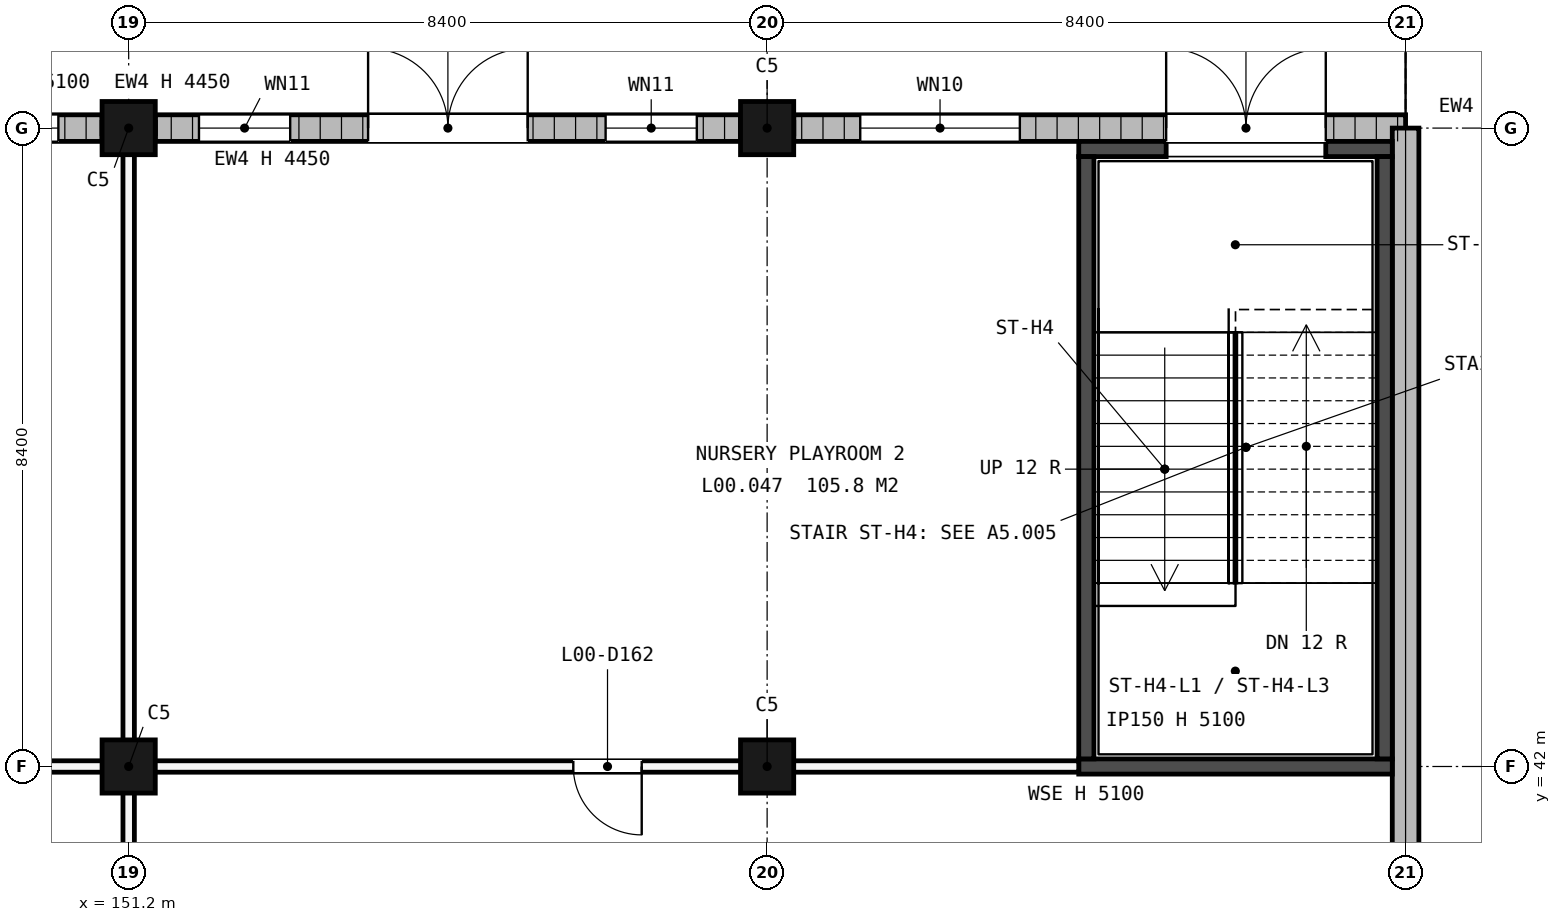
"""IFC4 building model, lengths in metres.
Left out: names, types, materials, properties, quantities, classifications, styles, units other than length and angle.
Written with IfcOpenShell. Run it as: python <this file> out.ifc"""

import sys

from ifc_helpers import new_model, si_unit, direction, frame, frame_2d, origin, origin_2d, place, context, subcontext, project, spatial, rectangle, extrude, element, fill, save


model = new_model("IFC4")
c1 = context("Model", 3, precision=1e-05, world=origin(), true_north=direction((0.0, 1.0)))
c2 = subcontext(c1, "Body", "Model", "MODEL_VIEW")
j1 = project(units=[si_unit("LENGTHUNIT", "METRE"), si_unit("PLANEANGLEUNIT", "RADIAN")], contexts=[c1])
p1 = place(None, origin())
s1 = spatial("IfcSite", under=j1, at=p1, CompositionType="ELEMENT")
p2 = place(p1, origin())
s2 = spatial("IfcBuilding", under=s1, at=p2, CompositionType="ELEMENT")
p3 = place(p2, origin())
s3 = spatial("IfcBuildingStorey", under=s2, at=p3, CompositionType="ELEMENT", Elevation=0.0)
for number, where, z_axis, x_axis in (
    (1, (151.2, 42.0, -0.3), (0.0, 0.0, 1.0), (1.0, 0.0, 0.0)),
    (2, (151.2, 50.4, -0.3), (0.0, 0.0, 1.0), (1.0, 0.0, 0.0)),
    (3, (159.6, 42.0, -0.3), (0.0, 0.0, 1.0), (1.0, 0.0, 0.0)),
    (4, (159.6, 50.4, -0.3), (0.0, 0.0, 1.0), (1.0, 0.0, 0.0)),
):
    element("IfcColumn", number, at=place(p3, frame(where, z_axis=z_axis, x_axis=x_axis)), inside=s3, PredefinedType="COLUMN", context=c2, shape_type="SweptSolid", body=[
        extrude(rectangle(XDim=0.7, YDim=0.7, at=origin_2d()), origin(), (0.0, 0.0, 1.0), 5.4),
    ])
p4 = place(p3, frame((143.15, 50.4, 0.0), z_axis=(0.0, 0.0, 1.0), x_axis=(1.0, 0.0, 0.0)))
e5 = element("IfcWall", 5, at=p4, inside=s3, PredefinedType="STANDARD", context=c2, shape_type="SweptSolid", body=[
    extrude(rectangle(XDim=7.7, YDim=0.35, at=frame_2d((3.85, 0.0))), origin(), (0.0, 0.0, 1.0), 4.45),
])
p5 = place(p4, frame((2.8, 0.0, 0.0)))
e6 = element("IfcOpeningElement", 6, at=p5, cuts=e5, PredefinedType="OPENING", context=c2, shape_type="SweptSolid", body=[
    extrude(rectangle(XDim=2.1, YDim=2.2, at=frame_2d((1.05, 1.1))), frame((0.0, 0.185, 0.0), z_axis=(0.0, -1.0, 0.0), x_axis=(1.0, 0.0, 0.0)), (0.0, 0.0, 1.0), 0.37),
])
p6 = place(p4, frame((0.575, 0.0, 0.6)))
e7 = element("IfcOpeningElement", 7, at=p6, cuts=e5, PredefinedType="OPENING", context=c2, shape_type="SweptSolid", body=[
    extrude(rectangle(XDim=1.2, YDim=1.8, at=frame_2d((0.6, 0.9))), frame((0.0, 0.185, 0.0), z_axis=(0.0, -1.0, 0.0), x_axis=(1.0, 0.0, 0.0)), (0.0, 0.0, 1.0), 0.37),
])
p7 = place(p4, frame((5.925, 0.0, 0.6)))
e8 = element("IfcOpeningElement", 8, at=p7, cuts=e5, PredefinedType="OPENING", context=c2, shape_type="SweptSolid", body=[
    extrude(rectangle(XDim=1.2, YDim=1.8, at=frame_2d((0.6, 0.9))), frame((0.0, 0.185, 0.0), z_axis=(0.0, -1.0, 0.0), x_axis=(1.0, 0.0, 0.0)), (0.0, 0.0, 1.0), 0.37),
])
p8 = place(p3, frame((151.55, 50.4, 0.0), z_axis=(0.0, 0.0, 1.0), x_axis=(1.0, 0.0, 0.0)))
e9 = element("IfcWall", 9, at=p8, inside=s3, PredefinedType="STANDARD", context=c2, shape_type="SweptSolid", body=[
    extrude(rectangle(XDim=7.7, YDim=0.35, at=frame_2d((3.85, 0.0))), origin(), (0.0, 0.0, 1.0), 4.45),
])
p9 = place(p8, frame((2.8, 0.0, 0.0)))
e10 = element("IfcOpeningElement", 10, at=p9, cuts=e9, PredefinedType="OPENING", context=c2, shape_type="SweptSolid", body=[
    extrude(rectangle(XDim=2.1, YDim=2.2, at=frame_2d((1.05, 1.1))), frame((0.0, 0.185, 0.0), z_axis=(0.0, -1.0, 0.0), x_axis=(1.0, 0.0, 0.0)), (0.0, 0.0, 1.0), 0.37),
])
p10 = place(p8, frame((0.575, 0.0, 0.6)))
e11 = element("IfcOpeningElement", 11, at=p10, cuts=e9, PredefinedType="OPENING", context=c2, shape_type="SweptSolid", body=[
    extrude(rectangle(XDim=1.2, YDim=1.8, at=frame_2d((0.6, 0.9))), frame((0.0, 0.185, 0.0), z_axis=(0.0, -1.0, 0.0), x_axis=(1.0, 0.0, 0.0)), (0.0, 0.0, 1.0), 0.37),
])
p11 = place(p8, frame((5.925, 0.0, 0.6)))
e12 = element("IfcOpeningElement", 12, at=p11, cuts=e9, PredefinedType="OPENING", context=c2, shape_type="SweptSolid", body=[
    extrude(rectangle(XDim=1.2, YDim=1.8, at=frame_2d((0.6, 0.9))), frame((0.0, 0.185, 0.0), z_axis=(0.0, -1.0, 0.0), x_axis=(1.0, 0.0, 0.0)), (0.0, 0.0, 1.0), 0.37),
])
p12 = place(p3, frame((159.95, 50.4, 0.0), z_axis=(0.0, 0.0, 1.0), x_axis=(1.0, 0.0, 0.0)))
e13 = element("IfcWall", 13, at=p12, inside=s3, PredefinedType="STANDARD", context=c2, shape_type="SweptSolid", body=[
    extrude(rectangle(XDim=8.05, YDim=0.35, at=frame_2d((4.025, 0.0))), origin(), (0.0, 0.0, 1.0), 5.1),
])
p13 = place(p12, frame((4.9, 0.0, 0.0)))
e14 = element("IfcOpeningElement", 14, at=p13, cuts=e13, PredefinedType="OPENING", context=c2, shape_type="SweptSolid", body=[
    extrude(rectangle(XDim=2.1, YDim=2.2, at=frame_2d((1.05, 1.1))), frame((0.0, 0.185, 0.0), z_axis=(0.0, -1.0, 0.0), x_axis=(1.0, 0.0, 0.0)), (0.0, 0.0, 1.0), 0.37),
])
p14 = place(p12, frame((0.875, 0.0, 0.6)))
e15 = element("IfcOpeningElement", 15, at=p14, cuts=e13, PredefinedType="OPENING", context=c2, shape_type="SweptSolid", body=[
    extrude(rectangle(XDim=2.1, YDim=1.8, at=frame_2d((1.05, 0.9))), frame((0.0, 0.185, 0.0), z_axis=(0.0, -1.0, 0.0), x_axis=(1.0, 0.0, 0.0)), (0.0, 0.0, 1.0), 0.37),
])
p15 = place(p3, frame((168.0, 33.95, 0.0), z_axis=(0.0, 0.0, 1.0), x_axis=(0.0, 1.0, 0.0)))
e16 = element("IfcWall", 16, at=p15, inside=s3, PredefinedType="STANDARD", context=c2, shape_type="SweptSolid", body=[
    extrude(rectangle(XDim=16.45, YDim=0.35, at=frame_2d((8.225, 0.0))), origin(), (0.0, 0.0, 1.0), 5.1),
])
p16 = place(p15, frame((2.975, 0.0, 0.6)))
e17 = element("IfcOpeningElement", 17, at=p16, cuts=e16, PredefinedType="OPENING", context=c2, shape_type="SweptSolid", body=[
    extrude(rectangle(XDim=2.1, YDim=1.8, at=frame_2d((1.05, 0.9))), frame((0.0, 0.185, 0.0), z_axis=(0.0, -1.0, 0.0), x_axis=(1.0, 0.0, 0.0)), (0.0, 0.0, 1.0), 0.37),
])
p17 = place(p3, frame((163.7, 42.0, 0.0), z_axis=(0.0, 0.0, 1.0), x_axis=(1.0, 0.0, 0.0)))
e18 = element("IfcWall", 18, at=p17, inside=s3, PredefinedType="SHEAR", context=c2, shape_type="SweptSolid", body=[
    extrude(rectangle(XDim=4.125, YDim=0.2, at=frame_2d((2.062, 0.0))), origin(), (0.0, 0.0, 1.0), 5.1),
])
p18 = place(p3, frame((163.7, 50.125, 0.0), z_axis=(0.0, 0.0, 1.0), x_axis=(1.0, 0.0, 0.0)))
e19 = element("IfcWall", 19, at=p18, inside=s3, PredefinedType="SHEAR", context=c2, shape_type="SweptSolid", body=[
    extrude(rectangle(XDim=1.15, YDim=0.2, at=frame_2d((0.575, 0.0))), origin(), (0.0, 0.0, 1.0), 5.1),
])
p19 = place(p3, frame((166.95, 50.125, 0.0), z_axis=(0.0, 0.0, 1.0), x_axis=(1.0, 0.0, 0.0)))
e20 = element("IfcWall", 20, at=p19, inside=s3, PredefinedType="SHEAR", context=c2, shape_type="SweptSolid", body=[
    extrude(rectangle(XDim=0.875, YDim=0.2, at=frame_2d((0.438, 0.0))), origin(), (0.0, 0.0, 1.0), 5.1),
])
for number, where, z_axis, x_axis in (
    (21, (163.8, 42.1, 0.0), (0.0, 0.0, 1.0), (0.0, 1.0, 0.0)),
    (22, (167.725, 42.1, 0.0), (0.0, 0.0, 1.0), (0.0, 1.0, 0.0)),
):
    element("IfcWall", number, at=place(p3, frame(where, z_axis=z_axis, x_axis=x_axis)), inside=s3, PredefinedType="SHEAR", context=c2, shape_type="SweptSolid", body=[
        extrude(rectangle(XDim=7.925, YDim=0.2, at=frame_2d((3.962, 0.0))), origin(), (0.0, 0.0, 1.0), 5.1),
    ])
p20 = place(p3, frame((143.13, 42.0, 0.0), z_axis=(0.0, 0.0, 1.0), x_axis=(1.0, 0.0, 0.0)))
e23 = element("IfcWall", 23, at=p20, inside=s3, PredefinedType="PARTITIONING", context=c2, shape_type="SweptSolid", body=[
    extrude(rectangle(XDim=16.14, YDim=0.15, at=frame_2d((8.07, 0.0))), origin(), (0.0, 0.0, 1.0), 4.3),
])
p21 = place(p20, frame((3.42, 0.0, 0.0)))
e24 = element("IfcOpeningElement", 24, at=p21, cuts=e23, PredefinedType="OPENING", context=c2, shape_type="SweptSolid", body=[
    extrude(rectangle(XDim=0.9, YDim=2.1, at=frame_2d((0.45, 1.05))), frame((0.0, 0.085, 0.0), z_axis=(0.0, -1.0, 0.0), x_axis=(1.0, 0.0, 0.0)), (0.0, 0.0, 1.0), 0.17),
])
p22 = place(p20, frame((13.92, 0.0, 0.0)))
e25 = element("IfcOpeningElement", 25, at=p22, cuts=e23, PredefinedType="OPENING", context=c2, shape_type="SweptSolid", body=[
    extrude(rectangle(XDim=0.9, YDim=2.25, at=frame_2d((0.45, 1.125))), frame((0.0, 0.085, 0.0), z_axis=(0.0, -1.0, 0.0), x_axis=(1.0, 0.0, 0.0)), (0.0, 0.0, 1.0), 0.17),
])
p23 = place(p3, frame((159.27, 42.0, 0.0), z_axis=(0.0, 0.0, 1.0), x_axis=(1.0, 0.0, 0.0)))
e26 = element("IfcWall", 26, at=p23, inside=s3, PredefinedType="PARTITIONING", context=c2, shape_type="SweptSolid", body=[
    extrude(rectangle(XDim=4.43, YDim=0.15, at=frame_2d((2.215, 0.0))), origin(), (0.0, 0.0, 1.0), 5.1),
])
for number, where, z_axis, x_axis in (
    (27, (150.85, 50.4, 0.0), (0.0, 0.0, 1.0), (1.0, 0.0, 0.0)),
    (28, (159.25, 50.4, 0.0), (0.0, 0.0, 1.0), (1.0, 0.0, 0.0)),
):
    element("IfcWall", number, at=place(p3, frame(where, z_axis=z_axis, x_axis=x_axis)), inside=s3, PredefinedType="PARTITIONING", context=c2, shape_type="SweptSolid", body=[
        extrude(rectangle(XDim=0.7, YDim=0.15, at=frame_2d((0.35, 0.0))), origin(), (0.0, 0.0, 1.0), 5.1),
    ])
p24 = place(p3, frame((151.2, 27.675, 0.0), z_axis=(0.0, 0.0, 1.0), x_axis=(0.0, 1.0, 0.0)))
e29 = element("IfcWall", 29, at=p24, inside=s3, PredefinedType="PARTITIONING", context=c2, shape_type="SweptSolid", body=[
    extrude(rectangle(XDim=22.65, YDim=0.15, at=frame_2d((11.325, 0.0))), origin(), (0.0, 0.0, 1.0), 4.3),
])
p25 = place(p7, origin())
e30 = element("IfcWindow", 30, at=p25, inside=s3, PartitioningType="SINGLE_PANEL", PredefinedType="WINDOW", context=c2, shape_type="SweptSolid", body=[
    extrude(rectangle(XDim=1.2, YDim=1.8, at=frame_2d((0.6, 0.9))), frame((0.0, 0.03, 0.0), z_axis=(0.0, -1.0, 0.0), x_axis=(1.0, 0.0, 0.0)), (0.0, 0.0, 1.0), 0.06),
])
fill(e8, e30)
p26 = place(p9, origin())
e31 = element("IfcDoor", 31, at=p26, inside=s3, OperationType="SINGLE_SWING_LEFT", PredefinedType="DOOR", context=c2, shape_type="SweptSolid", body=[
    extrude(rectangle(XDim=2.1, YDim=0.013, at=frame_2d((1.05, 0.007))), frame((0.0, 0.115, 0.0), z_axis=(0.0, -1.0, 0.0), x_axis=(1.0, 0.0, 0.0)), (0.0, 0.0, 1.0), 0.23),
    extrude(rectangle(XDim=0.075, YDim=2.112, at=frame_2d((0.038, 1.069))), frame((0.0, 0.125, 0.0), z_axis=(0.0, -1.0, 0.0), x_axis=(1.0, 0.0, 0.0)), (0.0, 0.0, 1.0), 0.25),
    extrude(rectangle(XDim=0.075, YDim=2.112, at=frame_2d((2.062, 1.069))), frame((0.0, 0.125, 0.0), z_axis=(0.0, -1.0, 0.0), x_axis=(1.0, 0.0, 0.0)), (0.0, 0.0, 1.0), 0.25),
    extrude(rectangle(XDim=2.1, YDim=0.075, at=frame_2d((1.05, 2.163))), frame((0.0, 0.115, 0.0), z_axis=(0.0, -1.0, 0.0), x_axis=(1.0, 0.0, 0.0)), (0.0, 0.0, 1.0), 0.23),
    extrude(rectangle(XDim=1.95, YDim=0.3, at=frame_2d((1.05, 0.163))), frame((0.0, 0.02, 0.0), z_axis=(0.0, -1.0, 0.0), x_axis=(1.0, 0.0, 0.0)), (0.0, 0.0, 1.0), 0.04),
    extrude(rectangle(XDim=1.95, YDim=0.12, at=frame_2d((1.05, 2.065))), frame((0.0, 0.02, 0.0), z_axis=(0.0, -1.0, 0.0), x_axis=(1.0, 0.0, 0.0)), (0.0, 0.0, 1.0), 0.04),
    extrude(rectangle(XDim=0.09, YDim=1.692, at=frame_2d((0.12, 1.159))), frame((0.0, 0.025, 0.0), z_axis=(0.0, -1.0, 0.0), x_axis=(1.0, 0.0, 0.0)), (0.0, 0.0, 1.0), 0.05),
    extrude(rectangle(XDim=0.18, YDim=1.692, at=frame_2d((1.05, 1.159))), frame((0.0, 0.025, 0.0), z_axis=(0.0, -1.0, 0.0), x_axis=(1.0, 0.0, 0.0)), (0.0, 0.0, 1.0), 0.05),
    extrude(rectangle(XDim=0.09, YDim=1.692, at=frame_2d((1.98, 1.159))), frame((0.0, 0.025, 0.0), z_axis=(0.0, -1.0, 0.0), x_axis=(1.0, 0.0, 0.0)), (0.0, 0.0, 1.0), 0.05),
    extrude(rectangle(XDim=0.795, YDim=1.692, at=frame_2d((0.562, 1.159))), frame((0.0, 0.012, 0.0), z_axis=(0.0, -1.0, 0.0), x_axis=(1.0, 0.0, 0.0)), (0.0, 0.0, 1.0), 0.024),
    extrude(rectangle(XDim=0.795, YDim=1.692, at=frame_2d((1.538, 1.159))), frame((0.0, 0.012, 0.0), z_axis=(0.0, -1.0, 0.0), x_axis=(1.0, 0.0, 0.0)), (0.0, 0.0, 1.0), 0.024),
])
fill(e10, e31)
p27 = place(p10, origin())
e32 = element("IfcWindow", 32, at=p27, inside=s3, PartitioningType="SINGLE_PANEL", PredefinedType="WINDOW", context=c2, shape_type="SweptSolid", body=[
    extrude(rectangle(XDim=1.2, YDim=1.8, at=frame_2d((0.6, 0.9))), frame((0.0, 0.03, 0.0), z_axis=(0.0, -1.0, 0.0), x_axis=(1.0, 0.0, 0.0)), (0.0, 0.0, 1.0), 0.06),
])
fill(e11, e32)
p28 = place(p11, origin())
e33 = element("IfcWindow", 33, at=p28, inside=s3, PartitioningType="SINGLE_PANEL", PredefinedType="WINDOW", context=c2, shape_type="SweptSolid", body=[
    extrude(rectangle(XDim=1.2, YDim=1.8, at=frame_2d((0.6, 0.9))), frame((0.0, 0.03, 0.0), z_axis=(0.0, -1.0, 0.0), x_axis=(1.0, 0.0, 0.0)), (0.0, 0.0, 1.0), 0.06),
])
fill(e12, e33)
p29 = place(p13, origin())
e34 = element("IfcDoor", 34, at=p29, inside=s3, OperationType="SINGLE_SWING_LEFT", PredefinedType="DOOR", context=c2, shape_type="SweptSolid", body=[
    extrude(rectangle(XDim=2.1, YDim=0.013, at=frame_2d((1.05, 0.007))), frame((0.0, 0.115, 0.0), z_axis=(0.0, -1.0, 0.0), x_axis=(1.0, 0.0, 0.0)), (0.0, 0.0, 1.0), 0.23),
    extrude(rectangle(XDim=0.075, YDim=2.112, at=frame_2d((0.038, 1.069))), frame((0.0, 0.125, 0.0), z_axis=(0.0, -1.0, 0.0), x_axis=(1.0, 0.0, 0.0)), (0.0, 0.0, 1.0), 0.25),
    extrude(rectangle(XDim=0.075, YDim=2.112, at=frame_2d((2.062, 1.069))), frame((0.0, 0.125, 0.0), z_axis=(0.0, -1.0, 0.0), x_axis=(1.0, 0.0, 0.0)), (0.0, 0.0, 1.0), 0.25),
    extrude(rectangle(XDim=2.1, YDim=0.075, at=frame_2d((1.05, 2.163))), frame((0.0, 0.115, 0.0), z_axis=(0.0, -1.0, 0.0), x_axis=(1.0, 0.0, 0.0)), (0.0, 0.0, 1.0), 0.23),
    extrude(rectangle(XDim=1.95, YDim=2.112, at=frame_2d((1.05, 1.069))), frame((0.0, 0.025, 0.0), z_axis=(0.0, -1.0, 0.0), x_axis=(1.0, 0.0, 0.0)), (0.0, 0.0, 1.0), 0.05),
])
fill(e14, e34)
p30 = place(p14, origin())
e35 = element("IfcWindow", 35, at=p30, inside=s3, PartitioningType="SINGLE_PANEL", PredefinedType="WINDOW", context=c2, shape_type="SweptSolid", body=[
    extrude(rectangle(XDim=2.1, YDim=1.8, at=frame_2d((1.05, 0.9))), frame((0.0, 0.03, 0.0), z_axis=(0.0, -1.0, 0.0), x_axis=(1.0, 0.0, 0.0)), (0.0, 0.0, 1.0), 0.06),
])
fill(e15, e35)
p31 = place(p22, origin())
e36 = element("IfcDoor", 36, at=p31, inside=s3, OperationType="SINGLE_SWING_RIGHT", PredefinedType="DOOR", context=c2, shape_type="SweptSolid", body=[
    extrude(rectangle(XDim=0.9, YDim=2.25, at=frame_2d((0.45, 1.125))), frame((0.0, 0.025, 0.0), z_axis=(0.0, -1.0, 0.0), x_axis=(1.0, 0.0, 0.0)), (0.0, 0.0, 1.0), 0.05),
])
fill(e25, e36)
save(model, sys.argv[1])
